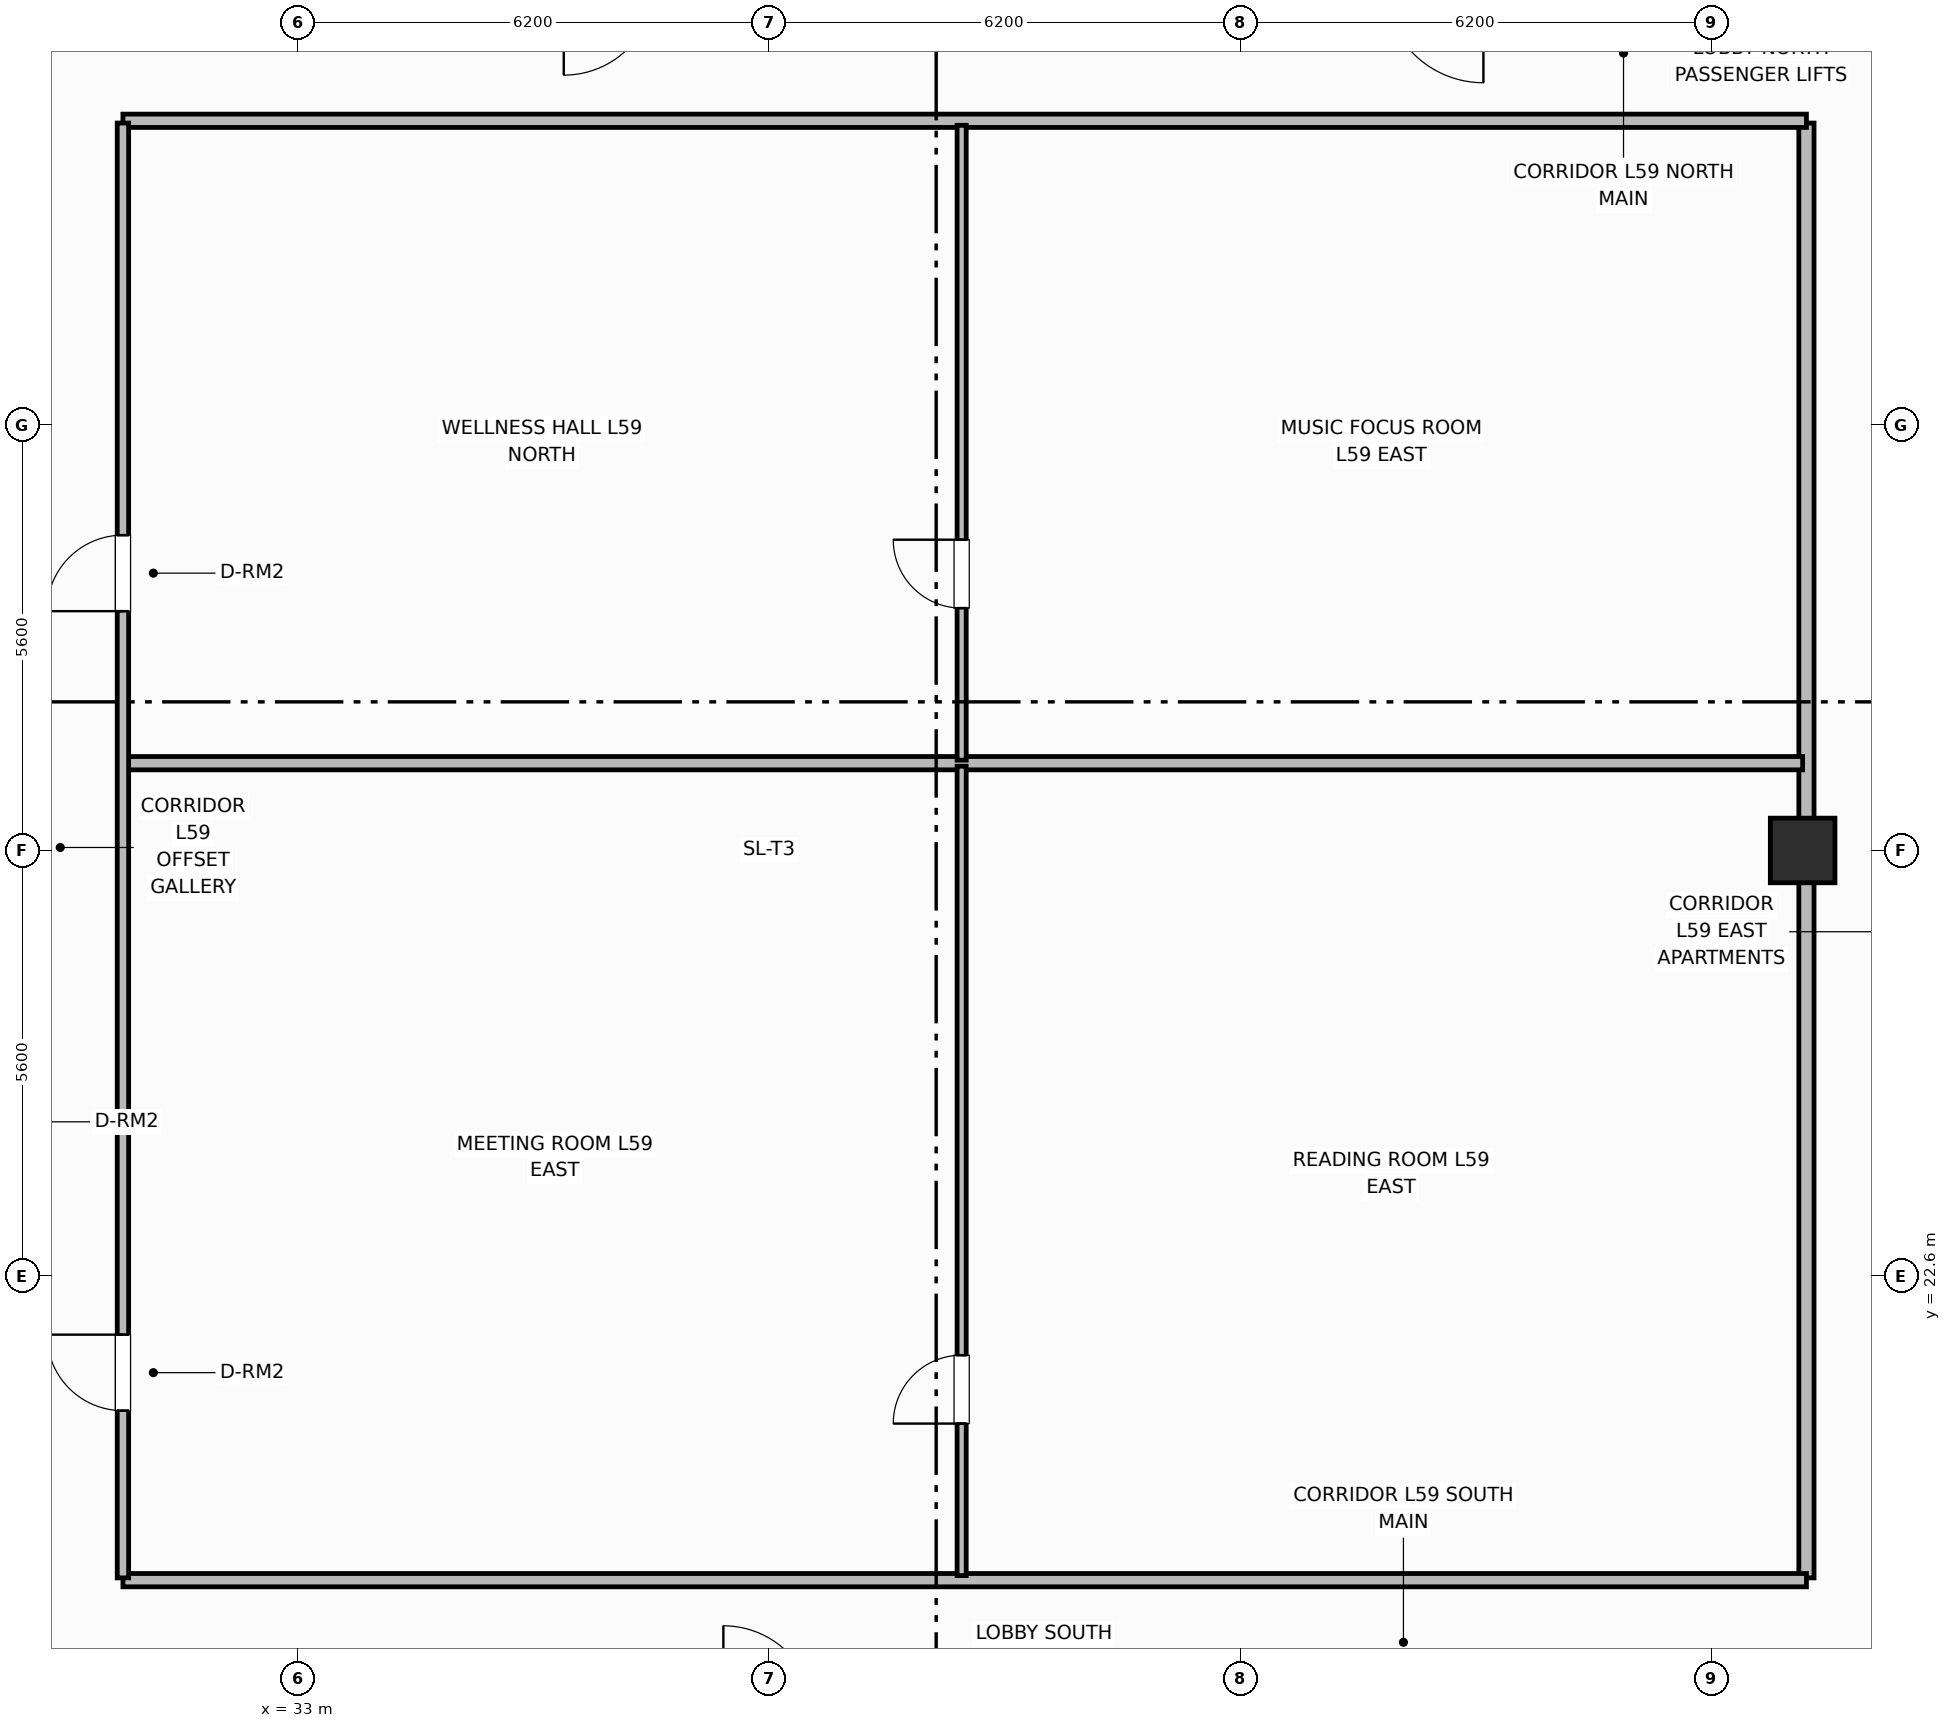
"""IFC4 building model, lengths in metres.
Left out: names, types, materials, properties, quantities, classifications, styles, units other than length and angle.
Written with IfcOpenShell. Run it as: python <this file> out.ifc"""

import sys

from ifc_helpers import new_model, si_unit, direction, frame, frame_2d, origin, origin_2d, place, context, subcontext, project, spatial, rectangle, extrude, element, fill, save


model = new_model("IFC4")
c1 = context("Model", 3, precision=1e-05, world=origin(), true_north=direction((0.0, 1.0)))
c2 = subcontext(c1, "Body", "Model", "MODEL_VIEW")
j1 = project(units=[si_unit("LENGTHUNIT", "METRE"), si_unit("PLANEANGLEUNIT", "RADIAN")], contexts=[c1])
p1 = place(None, origin())
s1 = spatial("IfcSite", under=j1, at=p1, CompositionType="ELEMENT")
p2 = place(p1, origin())
s2 = spatial("IfcBuilding", under=s1, at=p2, CompositionType="ELEMENT")
p3 = place(p2, frame((0.0, 0.0, 236.9)))
s3 = spatial("IfcBuildingStorey", under=s2, at=p3, CompositionType="ELEMENT", Elevation=236.9)
p4 = place(p3, frame((52.8, 28.2, 0.0), z_axis=(0.0, 0.0, 1.0), x_axis=(1.0, 0.0, 0.0)))
e1 = element("IfcColumn", 1, at=p4, inside=s3, PredefinedType="COLUMN", context=c2, shape_type="SweptSolid", body=[
    extrude(rectangle(XDim=0.85, YDim=0.85, at=origin_2d()), origin(), (0.0, 0.0, 1.0), 3.7),
])
p5 = place(p3, frame((52.85, 18.63, 0.0), z_axis=(0.0, 0.0, 1.0), x_axis=(0.0, 1.0, 0.0)))
e2 = element("IfcWall", 2, at=p5, inside=s3, PredefinedType="PARTITIONING", context=c2, shape_type="SweptSolid", body=[
    extrude(rectangle(XDim=19.14, YDim=0.2, at=frame_2d((9.57, 0.0))), origin(), (0.0, 0.0, 1.0), 2.56),
])
for number, where, z_axis, x_axis in (
    (3, (30.7, 18.6, 0.0), (0.0, 0.0, 1.0), (1.0, 0.0, 0.0)),
    (4, (30.7, 37.8, 0.0), (0.0, 0.0, 1.0), (1.0, 0.0, 0.0)),
):
    element("IfcWall", number, at=place(p3, frame(where, z_axis=z_axis, x_axis=x_axis)), inside=s3, PredefinedType="PARTITIONING", context=c2, shape_type="SweptSolid", body=[
        extrude(rectangle(XDim=22.15, YDim=0.175, at=frame_2d((11.075, 0.0))), origin(), (0.0, 0.0, 1.0), 2.56),
    ])
p6 = place(p3, frame((30.73, 29.348, 0.0), z_axis=(0.0, 0.0, 1.0), x_axis=(1.0, 0.0, 0.0)))
e5 = element("IfcWall", 5, at=p6, inside=s3, PredefinedType="PARTITIONING", context=c2, shape_type="SweptSolid", body=[
    extrude(rectangle(XDim=22.07, YDim=0.175, at=frame_2d((11.035, 0.0))), origin(), (0.0, 0.0, 1.0), 2.56),
])
p7 = place(p3, frame((41.735, 18.66, 0.0), z_axis=(0.0, 0.0, 1.0), x_axis=(0.0, 1.0, 0.0)))
e6 = element("IfcWall", 6, at=p7, inside=s3, PredefinedType="PARTITIONING", context=c2, shape_type="SweptSolid", body=[
    extrude(rectangle(XDim=10.648, YDim=0.12, at=frame_2d((5.324, 0.0))), origin(), (0.0, 0.0, 1.0), 2.56),
])
p8 = place(p7, frame((2.0, 0.0, 0.0)))
e7 = element("IfcOpeningElement", 7, at=p8, cuts=e6, PredefinedType="OPENING", context=c2, shape_type="SweptSolid", body=[
    extrude(rectangle(XDim=0.9, YDim=2.1, at=frame_2d((0.45, 1.05))), frame((0.0, 0.07, 0.0), z_axis=(0.0, -1.0, 0.0), x_axis=(1.0, 0.0, 0.0)), (0.0, 0.0, 1.0), 0.14),
])
p9 = place(p3, frame((41.735, 29.388, 0.0), z_axis=(0.0, 0.0, 1.0), x_axis=(0.0, 1.0, 0.0)))
e8 = element("IfcWall", 8, at=p9, inside=s3, PredefinedType="PARTITIONING", context=c2, shape_type="SweptSolid", body=[
    extrude(rectangle(XDim=8.352, YDim=0.12, at=frame_2d((4.176, 0.0))), origin(), (0.0, 0.0, 1.0), 2.56),
])
p10 = place(p9, frame((2.0, 0.0, 0.0)))
e9 = element("IfcOpeningElement", 9, at=p10, cuts=e8, PredefinedType="OPENING", context=c2, shape_type="SweptSolid", body=[
    extrude(rectangle(XDim=0.9, YDim=2.1, at=frame_2d((0.45, 1.05))), frame((0.0, 0.07, 0.0), z_axis=(0.0, -1.0, 0.0), x_axis=(1.0, 0.0, 0.0)), (0.0, 0.0, 1.0), 0.14),
])
p11 = place(p3, frame((30.7, 18.63, 0.0), z_axis=(0.0, 0.0, 1.0), x_axis=(0.0, 1.0, 0.0)))
e10 = element("IfcWall", 10, at=p11, inside=s3, PredefinedType="PARTITIONING", context=c2, shape_type="SweptSolid", body=[
    extrude(rectangle(XDim=19.14, YDim=0.15, at=frame_2d((9.57, 0.0))), origin(), (0.0, 0.0, 1.0), 2.56),
])
p12 = place(p11, frame((2.2, 0.0, 0.0)))
e11 = element("IfcOpeningElement", 11, at=p12, cuts=e10, PredefinedType="OPENING", context=c2, shape_type="SweptSolid", body=[
    extrude(rectangle(XDim=1.0, YDim=2.15, at=frame_2d((0.5, 1.075))), frame((0.0, 0.085, 0.0), z_axis=(0.0, -1.0, 0.0), x_axis=(1.0, 0.0, 0.0)), (0.0, 0.0, 1.0), 0.17),
])
p13 = place(p11, frame((12.719, 0.0, 0.0)))
e12 = element("IfcOpeningElement", 12, at=p13, cuts=e10, PredefinedType="OPENING", context=c2, shape_type="SweptSolid", body=[
    extrude(rectangle(XDim=1.0, YDim=2.15, at=frame_2d((0.5, 1.075))), frame((0.0, 0.085, 0.0), z_axis=(0.0, -1.0, 0.0), x_axis=(1.0, 0.0, 0.0)), (0.0, 0.0, 1.0), 0.17),
])
p14 = place(p8, origin())
e13 = element("IfcDoor", 13, at=p14, inside=s3, OperationType="SINGLE_SWING_LEFT", PredefinedType="DOOR", context=c2, shape_type="SweptSolid", body=[
    extrude(rectangle(XDim=0.9, YDim=2.1, at=frame_2d((0.45, 1.05))), frame((0.0, 0.025, 0.0), z_axis=(0.0, -1.0, 0.0), x_axis=(1.0, 0.0, 0.0)), (0.0, 0.0, 1.0), 0.05),
])
fill(e7, e13)
p15 = place(p10, origin())
e14 = element("IfcDoor", 14, at=p15, inside=s3, OperationType="SINGLE_SWING_RIGHT", PredefinedType="DOOR", context=c2, shape_type="SweptSolid", body=[
    extrude(rectangle(XDim=0.9, YDim=2.1, at=frame_2d((0.45, 1.05))), frame((0.0, 0.025, 0.0), z_axis=(0.0, -1.0, 0.0), x_axis=(1.0, 0.0, 0.0)), (0.0, 0.0, 1.0), 0.05),
])
fill(e9, e14)
p16 = place(p12, origin())
e15 = element("IfcDoor", 15, at=p16, inside=s3, OperationType="SINGLE_SWING_RIGHT", PredefinedType="DOOR", context=c2, shape_type="SweptSolid", body=[
    extrude(rectangle(XDim=1.0, YDim=2.15, at=frame_2d((0.5, 1.075))), frame((0.0, 0.025, 0.0), z_axis=(0.0, -1.0, 0.0), x_axis=(1.0, 0.0, 0.0)), (0.0, 0.0, 1.0), 0.05),
])
fill(e11, e15)
p17 = place(p13, origin())
e16 = element("IfcDoor", 16, at=p17, inside=s3, OperationType="SINGLE_SWING_LEFT", PredefinedType="DOOR", context=c2, shape_type="SweptSolid", body=[
    extrude(rectangle(XDim=1.0, YDim=2.15, at=frame_2d((0.5, 1.075))), frame((0.0, 0.025, 0.0), z_axis=(0.0, -1.0, 0.0), x_axis=(1.0, 0.0, 0.0)), (0.0, 0.0, 1.0), 0.05),
])
fill(e12, e16)
save(model, sys.argv[1])
